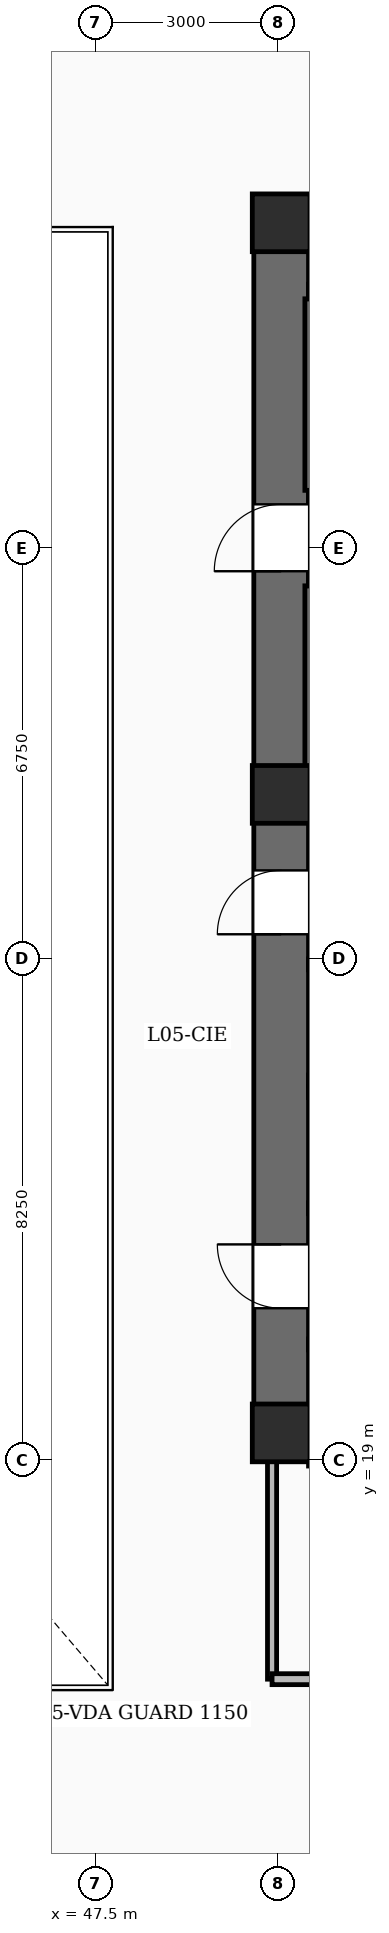
"""IFC4 building model, lengths in metres.
Left out: names, types, materials, properties, quantities, classifications, styles, units other than length and angle.
Written with IfcOpenShell. Run it as: python <this file> out.ifc"""

import sys

from ifc_helpers import new_model, si_unit, direction, frame, frame_2d, origin, origin_2d, place, context, subcontext, project, spatial, rectangle, extrude, element, fill, save


model = new_model("IFC4")
c1 = context("Model", 3, precision=1e-05, world=origin(), true_north=direction((0.0, 1.0)))
c2 = subcontext(c1, "Body", "Model", "MODEL_VIEW")
j1 = project(units=[si_unit("LENGTHUNIT", "METRE"), si_unit("PLANEANGLEUNIT", "RADIAN")], contexts=[c1])
p1 = place(None, origin())
s1 = spatial("IfcSite", under=j1, at=p1, CompositionType="ELEMENT")
p2 = place(p1, origin())
s2 = spatial("IfcBuilding", under=s1, at=p2, CompositionType="ELEMENT")
p3 = place(p2, frame((0.0, 0.0, 28.0)))
s3 = spatial("IfcBuildingStorey", under=s2, at=p3, CompositionType="ELEMENT", Elevation=28.0)
p4 = place(p3, frame((50.55, 19.0, -0.35), z_axis=(0.0, 0.0, 1.0), x_axis=(0.0, 1.0, 0.0)))
e1 = element("IfcWall", 1, at=p4, inside=s3, PredefinedType="SHEAR", context=c2, shape_type="SweptSolid", body=[
    extrude(rectangle(XDim=20.8, YDim=0.9, at=frame_2d((10.4, 0.0))), origin(), (0.0, 0.0, 1.0), 5.9),
])
p5 = place(p4, frame((2.5, 0.0, 0.35)))
e2 = element("IfcOpeningElement", 2, at=p5, cuts=e1, PredefinedType="OPENING", context=c2, shape_type="SweptSolid", body=[
    extrude(rectangle(XDim=1.05, YDim=2.15, at=frame_2d((0.525, 1.075))), frame((0.0, 0.46, 0.0), z_axis=(0.0, -1.0, 0.0), x_axis=(1.0, 0.0, 0.0)), (0.0, 0.0, 1.0), 0.92),
])
p6 = place(p4, frame((8.65, 0.0, 0.35)))
e3 = element("IfcOpeningElement", 3, at=p6, cuts=e1, PredefinedType="OPENING", context=c2, shape_type="SweptSolid", body=[
    extrude(rectangle(XDim=1.05, YDim=2.15, at=frame_2d((0.525, 1.075))), frame((0.0, 0.46, 0.0), z_axis=(0.0, -1.0, 0.0), x_axis=(1.0, 0.0, 0.0)), (0.0, 0.0, 1.0), 0.92),
])
p7 = place(p4, frame((14.62, 0.0, 0.35)))
e4 = element("IfcOpeningElement", 4, at=p7, cuts=e1, PredefinedType="OPENING", context=c2, shape_type="SweptSolid", body=[
    extrude(rectangle(XDim=1.1, YDim=2.15, at=frame_2d((0.55, 1.075))), frame((0.0, 0.46, 0.0), z_axis=(0.0, -1.0, 0.0), x_axis=(1.0, 0.0, 0.0)), (0.0, 0.0, 1.0), 0.92),
])
for number, where, z_axis, x_axis in (
    (5, (51.0, 19.45, -0.35), (0.0, 0.0, 1.0), (1.0, 0.0, 0.0)),
    (6, (51.0, 39.35, -0.35), (0.0, 0.0, 1.0), (1.0, 0.0, 0.0)),
):
    element("IfcWall", number, at=place(p3, frame(where, z_axis=z_axis, x_axis=x_axis)), inside=s3, PredefinedType="SHEAR", context=c2, shape_type="SweptSolid", body=[
        extrude(rectangle(XDim=8.9, YDim=0.9, at=frame_2d((4.45, 0.0))), origin(), (0.0, 0.0, 1.0), 5.9),
    ])
for number, where, z_axis, x_axis in (
    (7, (50.55, 19.45, -0.35), (0.0, 0.0, 1.0), (1.0, 0.0, 0.0)),
    (8, (50.55, 29.95, -0.35), (0.0, 0.0, 1.0), (1.0, 0.0, 0.0)),
    (9, (50.55, 39.35, -0.35), (0.0, 0.0, 1.0), (1.0, 0.0, 0.0)),
):
    element("IfcColumn", number, at=place(p3, frame(where, z_axis=z_axis, x_axis=x_axis)), inside=s3, PredefinedType="COLUMN", context=c2, shape_type="SweptSolid", body=[
        extrude(rectangle(XDim=0.95, YDim=0.95, at=origin_2d()), origin(), (0.0, 0.0, 1.0), 5.9),
    ])
p8 = place(p3, frame((59.9, 30.03, 0.0), z_axis=(0.0, 0.0, 1.0), x_axis=(-1.0, 0.0, 0.0)))
e10 = element("IfcWall", 10, at=p8, inside=s3, PredefinedType="SOLIDWALL", context=c2, shape_type="SweptSolid", body=[
    extrude(rectangle(XDim=8.9, YDim=0.24, at=frame_2d((4.45, 0.0))), origin(), (0.0, 0.0, 1.0), 5.55),
])
p9 = place(p8, frame((7.38, 0.0, 0.0)))
e11 = element("IfcOpeningElement", 11, at=p9, cuts=e10, PredefinedType="OPENING", context=c2, shape_type="SweptSolid", body=[
    extrude(rectangle(XDim=1.1, YDim=2.15, at=frame_2d((0.55, 1.075))), frame((0.0, 0.13, 0.0), z_axis=(0.0, -1.0, 0.0), x_axis=(1.0, 0.0, 0.0)), (0.0, 0.0, 1.0), 0.26),
])
p10 = place(p3, frame((51.0, 33.5, 0.0), z_axis=(0.0, 0.0, 1.0), x_axis=(1.0, 0.0, 0.0)))
e12 = element("IfcWall", 12, at=p10, inside=s3, PredefinedType="SOLIDWALL", context=c2, shape_type="SweptSolid", body=[
    extrude(rectangle(XDim=8.9, YDim=0.24, at=frame_2d((4.45, 0.0))), origin(), (0.0, 0.0, 1.0), 5.55),
])
p11 = place(p3, frame((51.06, 30.15, 0.0), z_axis=(0.0, 0.0, 1.0), x_axis=(0.0, 1.0, 0.0)))
e13 = element("IfcWall", 13, at=p11, inside=s3, PredefinedType="SOLIDWALL", context=c2, shape_type="SweptSolid", body=[
    extrude(rectangle(XDim=3.23, YDim=0.24, at=frame_2d((1.615, 0.0))), origin(), (0.0, 0.0, 1.0), 5.55),
])
p12 = place(p3, frame((59.9, 34.83, 0.0), z_axis=(0.0, 0.0, 1.0), x_axis=(-1.0, 0.0, 0.0)))
e14 = element("IfcWall", 14, at=p12, inside=s3, PredefinedType="SOLIDWALL", context=c2, shape_type="SweptSolid", body=[
    extrude(rectangle(XDim=8.9, YDim=0.24, at=frame_2d((4.45, 0.0))), origin(), (0.0, 0.0, 1.0), 5.55),
])
p13 = place(p12, frame((7.42, 0.0, 0.0)))
e15 = element("IfcOpeningElement", 15, at=p13, cuts=e14, PredefinedType="OPENING", context=c2, shape_type="SweptSolid", body=[
    extrude(rectangle(XDim=1.1, YDim=2.15, at=frame_2d((0.55, 1.075))), frame((0.0, 0.13, 0.0), z_axis=(0.0, -1.0, 0.0), x_axis=(1.0, 0.0, 0.0)), (0.0, 0.0, 1.0), 0.26),
])
p14 = place(p3, frame((51.0, 38.22, 0.0), z_axis=(0.0, 0.0, 1.0), x_axis=(1.0, 0.0, 0.0)))
e16 = element("IfcWall", 16, at=p14, inside=s3, PredefinedType="SOLIDWALL", context=c2, shape_type="SweptSolid", body=[
    extrude(rectangle(XDim=8.9, YDim=0.24, at=frame_2d((4.45, 0.0))), origin(), (0.0, 0.0, 1.0), 5.55),
])
p15 = place(p3, frame((51.06, 34.95, 0.0), z_axis=(0.0, 0.0, 1.0), x_axis=(0.0, 1.0, 0.0)))
e17 = element("IfcWall", 17, at=p15, inside=s3, PredefinedType="SOLIDWALL", context=c2, shape_type="SweptSolid", body=[
    extrude(rectangle(XDim=3.15, YDim=0.24, at=frame_2d((1.575, 0.0))), origin(), (0.0, 0.0, 1.0), 5.55),
])
for number, where, z_axis, x_axis in (
    (18, (51.0, 20.905, 0.0), (0.0, 0.0, 1.0), (1.0, 0.0, 0.0)),
    (19, (51.0, 18.995, 0.0), (0.0, 0.0, 1.0), (1.0, 0.0, 0.0)),
):
    element("IfcWall", number, at=place(p3, frame(where, z_axis=z_axis, x_axis=x_axis)), inside=s3, PredefinedType="SOLIDWALL", context=c2, shape_type="SweptSolid", body=[
        extrude(rectangle(XDim=2.79, YDim=0.18, at=frame_2d((1.395, 0.0))), origin(), (0.0, 0.0, 1.0), 5.55),
    ])
for number, where, z_axis, x_axis in (
    (20, (51.0, 25.055, 0.0), (0.0, 0.0, 1.0), (1.0, 0.0, 0.0)),
    (21, (51.0, 23.145, 0.0), (0.0, 0.0, 1.0), (1.0, 0.0, 0.0)),
):
    element("IfcWall", number, at=place(p3, frame(where, z_axis=z_axis, x_axis=x_axis)), inside=s3, PredefinedType="SOLIDWALL", context=c2, shape_type="SweptSolid", body=[
        extrude(rectangle(XDim=2.778, YDim=0.18, at=frame_2d((1.389, 0.0))), origin(), (0.0, 0.0, 1.0), 5.55),
    ])
p16 = place(p3, frame((51.0, 27.155, 0.0), z_axis=(0.0, 0.0, 1.0), x_axis=(1.0, 0.0, 0.0)))
e22 = element("IfcWall", 22, at=p16, inside=s3, PredefinedType="SOLIDWALL", context=c2, shape_type="SweptSolid", body=[
    extrude(rectangle(XDim=2.865, YDim=0.18, at=frame_2d((1.433, 0.0))), origin(), (0.0, 0.0, 1.0), 5.55),
])
p17 = place(p16, frame((0.785, 0.0, 0.0)))
e23 = element("IfcOpeningElement", 23, at=p17, cuts=e22, PredefinedType="OPENING", context=c2, shape_type="SweptSolid", body=[
    extrude(rectangle(XDim=1.35, YDim=2.3, at=frame_2d((0.675, 1.15))), frame((0.0, 0.1, 0.0), z_axis=(0.0, -1.0, 0.0), x_axis=(1.0, 0.0, 0.0)), (0.0, 0.0, 1.0), 0.2),
])
p18 = place(p3, frame((51.0, 25.245, 0.0), z_axis=(0.0, 0.0, 1.0), x_axis=(1.0, 0.0, 0.0)))
e24 = element("IfcWall", 24, at=p18, inside=s3, PredefinedType="SOLIDWALL", context=c2, shape_type="SweptSolid", body=[
    extrude(rectangle(XDim=2.865, YDim=0.18, at=frame_2d((1.433, 0.0))), origin(), (0.0, 0.0, 1.0), 5.55),
])
p19 = place(p3, frame((50.4, 15.4, 0.0), z_axis=(0.0, 0.0, 1.0), x_axis=(1.0, 0.0, 0.0)))
e25 = element("IfcWall", 25, at=p19, inside=s3, PredefinedType="SOLIDWALL", context=c2, shape_type="SweptSolid", body=[
    extrude(rectangle(XDim=10.0, YDim=0.18, at=frame_2d((5.0, 0.0))), origin(), (0.0, 0.0, 1.0), 4.61),
])
p20 = place(p19, frame((1.19, 0.0, 0.0)))
e26 = element("IfcOpeningElement", 26, at=p20, cuts=e25, PredefinedType="OPENING", context=c2, shape_type="SweptSolid", body=[
    extrude(rectangle(XDim=0.92, YDim=2.1, at=frame_2d((0.46, 1.05))), frame((0.0, 0.1, 0.0), z_axis=(0.0, -1.0, 0.0), x_axis=(1.0, 0.0, 0.0)), (0.0, 0.0, 1.0), 0.2),
])
p21 = place(p19, frame((4.54, 0.0, 0.0)))
e27 = element("IfcOpeningElement", 27, at=p21, cuts=e25, PredefinedType="OPENING", context=c2, shape_type="SweptSolid", body=[
    extrude(rectangle(XDim=0.92, YDim=2.1, at=frame_2d((0.46, 1.05))), frame((0.0, 0.1, 0.0), z_axis=(0.0, -1.0, 0.0), x_axis=(1.0, 0.0, 0.0)), (0.0, 0.0, 1.0), 0.2),
])
p22 = place(p19, frame((7.92, 0.0, 0.0)))
e28 = element("IfcOpeningElement", 28, at=p22, cuts=e25, PredefinedType="OPENING", context=c2, shape_type="SweptSolid", body=[
    extrude(rectangle(XDim=0.86, YDim=2.05, at=frame_2d((0.43, 1.025))), frame((0.0, 0.1, 0.0), z_axis=(0.0, -1.0, 0.0), x_axis=(1.0, 0.0, 0.0)), (0.0, 0.0, 1.0), 0.2),
])
p23 = place(p3, frame((50.4, 15.4, 0.0), z_axis=(0.0, 0.0, 1.0), x_axis=(0.0, 1.0, 0.0)))
e29 = element("IfcWall", 29, at=p23, inside=s3, PredefinedType="PARTITIONING", context=c2, shape_type="SweptSolid", body=[
    extrude(rectangle(XDim=3.58, YDim=0.15, at=frame_2d((1.79, 0.0))), origin(), (0.0, 0.0, 1.0), 4.61),
])
p24 = place(p5, origin())
e30 = element("IfcDoor", 30, at=p24, inside=s3, OperationType="SINGLE_SWING_RIGHT", PredefinedType="DOOR", context=c2, shape_type="SweptSolid", body=[
    extrude(rectangle(XDim=1.05, YDim=2.15, at=frame_2d((0.525, 1.075))), frame((0.0, 0.025, 0.0), z_axis=(0.0, -1.0, 0.0), x_axis=(1.0, 0.0, 0.0)), (0.0, 0.0, 1.0), 0.05),
])
fill(e2, e30)
p25 = place(p6, origin())
e31 = element("IfcDoor", 31, at=p25, inside=s3, OperationType="SINGLE_SWING_LEFT", PredefinedType="DOOR", context=c2, shape_type="SweptSolid", body=[
    extrude(rectangle(XDim=1.05, YDim=2.15, at=frame_2d((0.525, 1.075))), frame((0.0, 0.025, 0.0), z_axis=(0.0, -1.0, 0.0), x_axis=(1.0, 0.0, 0.0)), (0.0, 0.0, 1.0), 0.05),
])
fill(e3, e31)
p26 = place(p7, origin())
e32 = element("IfcDoor", 32, at=p26, inside=s3, OperationType="SINGLE_SWING_LEFT", PredefinedType="DOOR", context=c2, shape_type="SweptSolid", body=[
    extrude(rectangle(XDim=1.1, YDim=2.15, at=frame_2d((0.55, 1.075))), frame((0.0, 0.025, 0.0), z_axis=(0.0, -1.0, 0.0), x_axis=(1.0, 0.0, 0.0)), (0.0, 0.0, 1.0), 0.05),
])
fill(e4, e32)
save(model, sys.argv[1])
